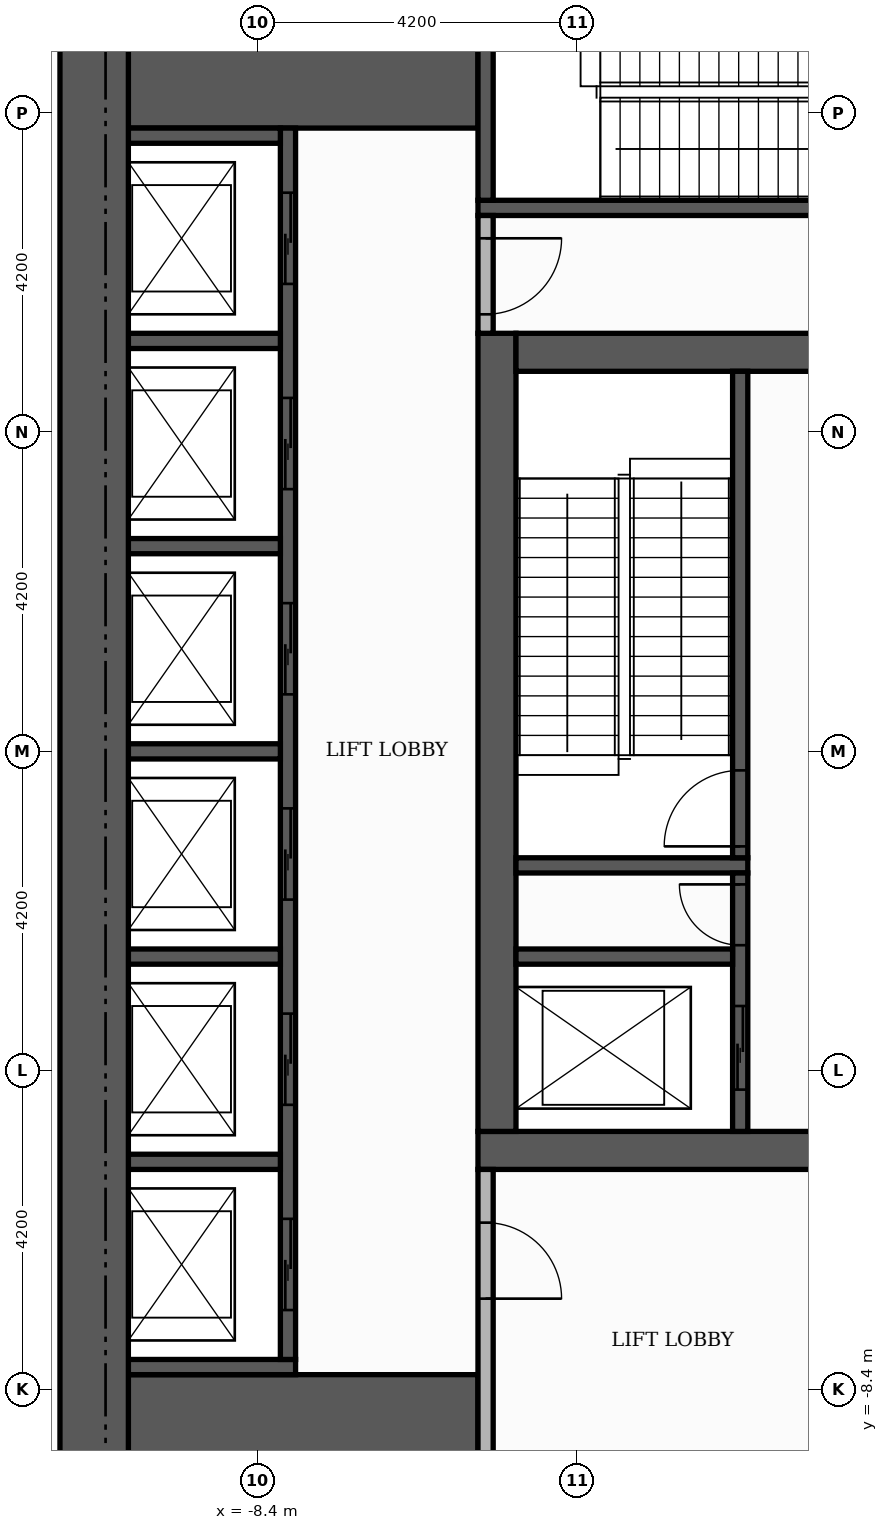
"""IFC4 building model, lengths in metres.
Left out: names, types, materials, properties, quantities, classifications, styles, units other than length and angle.
Written with IfcOpenShell. Run it as: python <this file> out.ifc"""

import sys

from ifc_helpers import new_model, si_unit, direction, frame, frame_2d, origin, place, context, subcontext, project, spatial, rectangle, extrude, element, fill, save


model = new_model("IFC4")
c1 = context("Model", 3, precision=1e-05, world=origin(), true_north=direction((0.0, 1.0)))
c2 = subcontext(c1, "Body", "Model", "MODEL_VIEW")
j1 = project(units=[si_unit("LENGTHUNIT", "METRE"), si_unit("PLANEANGLEUNIT", "RADIAN")], contexts=[c1])
p1 = place(None, origin())
s1 = spatial("IfcSite", under=j1, at=p1, CompositionType="ELEMENT")
p2 = place(p1, origin())
s2 = spatial("IfcBuilding", under=s1, at=p2, CompositionType="ELEMENT")
p3 = place(p2, frame((0.0, 0.0, 73.8)))
s3 = spatial("IfcBuildingStorey", under=s2, at=p3, CompositionType="ELEMENT", Elevation=73.8)
p4 = place(p3, frame((-5.5, -5.25, 0.0), z_axis=(0.0, 0.0, 1.0), x_axis=(1.0, 0.0, 0.0)))
e1 = element("IfcWall", 1, at=p4, inside=s3, PredefinedType="SHEAR", context=c2, shape_type="SweptSolid", body=[
    extrude(rectangle(XDim=11.0, YDim=0.5, at=frame_2d((5.5, 0.0))), origin(), (0.0, 0.0, 1.0), 4.98),
])
p5 = place(p4, frame((4.9, 0.0, 0.0)))
e2 = element("IfcOpeningElement", 2, at=p5, cuts=e1, PredefinedType="OPENING", context=c2, shape_type="SweptSolid", body=[
    extrude(rectangle(XDim=1.2, YDim=2.1, at=frame_2d((0.6, 1.05))), frame((0.0, 0.26, 0.0), z_axis=(0.0, -1.0, 0.0), x_axis=(1.0, 0.0, 0.0)), (0.0, 0.0, 1.0), 0.52),
])
p6 = place(p3, frame((-5.25, -5.0, 0.0), z_axis=(0.0, 0.0, 1.0), x_axis=(0.0, 1.0, 0.0)))
e3 = element("IfcWall", 3, at=p6, inside=s3, PredefinedType="SHEAR", context=c2, shape_type="SweptSolid", body=[
    extrude(rectangle(XDim=10.5, YDim=0.5, at=frame_2d((5.25, 0.0))), origin(), (0.0, 0.0, 1.0), 4.98),
])
p7 = place(p3, frame((-5.0, 5.25, 0.0), z_axis=(0.0, 0.0, 1.0), x_axis=(1.0, 0.0, 0.0)))
e4 = element("IfcWall", 4, at=p7, inside=s3, PredefinedType="SHEAR", context=c2, shape_type="SweptSolid", body=[
    extrude(rectangle(XDim=10.0, YDim=0.5, at=frame_2d((5.0, 0.0))), origin(), (0.0, 0.0, 1.0), 4.98),
])
p8 = place(p7, frame((4.4, 0.0, 0.0)))
e5 = element("IfcOpeningElement", 5, at=p8, cuts=e4, PredefinedType="OPENING", context=c2, shape_type="SweptSolid", body=[
    extrude(rectangle(XDim=1.2, YDim=2.1, at=frame_2d((0.6, 1.05))), frame((0.0, 0.26, 0.0), z_axis=(0.0, -1.0, 0.0), x_axis=(1.0, 0.0, 0.0)), (0.0, 0.0, 1.0), 0.52),
])
for number, where, z_axis, x_axis in (
    (6, (-10.1, -9.15, 0.0), (0.0, 0.0, 1.0), (1.0, 0.0, 0.0)),
    (7, (-10.1, 9.15, 0.0), (0.0, 0.0, 1.0), (1.0, 0.0, 0.0)),
):
    element("IfcWall", number, at=place(p3, frame(where, z_axis=z_axis, x_axis=x_axis)), inside=s3, PredefinedType="SHEAR", context=c2, shape_type="SweptSolid", body=[
        extrude(rectangle(XDim=4.6, YDim=1.9, at=frame_2d((2.3, 0.0))), origin(), (0.0, 0.0, 1.0), 4.98),
    ])
p9 = place(p3, frame((-5.0, -1.5, 0.0), z_axis=(0.0, 0.0, 1.0), x_axis=(1.0, 0.0, 0.0)))
e8 = element("IfcWall", 8, at=p9, inside=s3, PredefinedType="SHEAR", context=c2, shape_type="SweptSolid", body=[
    extrude(rectangle(XDim=3.05, YDim=0.2, at=frame_2d((1.525, 0.0))), origin(), (0.0, 0.0, 1.0), 4.98),
])
p10 = place(p3, frame((-2.05, -1.4, 0.0), z_axis=(0.0, 0.0, 1.0), x_axis=(0.0, 1.0, 0.0)))
e9 = element("IfcWall", 9, at=p10, inside=s3, PredefinedType="SHEAR", context=c2, shape_type="SweptSolid", body=[
    extrude(rectangle(XDim=6.4, YDim=0.2, at=frame_2d((3.2, 0.0))), origin(), (0.0, 0.0, 1.0), 4.98),
])
p11 = place(p10, frame((0.15, 0.0, 0.0)))
e10 = element("IfcOpeningElement", 10, at=p11, cuts=e9, PredefinedType="OPENING", context=c2, shape_type="SweptSolid", body=[
    extrude(rectangle(XDim=1.0, YDim=2.1, at=frame_2d((0.5, 1.05))), frame((0.0, 0.11, 0.0), z_axis=(0.0, -1.0, 0.0), x_axis=(1.0, 0.0, 0.0)), (0.0, 0.0, 1.0), 0.22),
])
p12 = place(p3, frame((-5.5, 7.15, 0.0), z_axis=(0.0, 0.0, 1.0), x_axis=(1.0, 0.0, 0.0)))
e11 = element("IfcWall", 11, at=p12, inside=s3, PredefinedType="SHEAR", context=c2, shape_type="SweptSolid", body=[
    extrude(rectangle(XDim=6.8, YDim=0.2, at=frame_2d((3.4, 0.0))), origin(), (0.0, 0.0, 1.0), 4.98),
])
p13 = place(p3, frame((-5.4, 7.25, 0.0), z_axis=(0.0, 0.0, 1.0), x_axis=(0.0, 1.0, 0.0)))
e12 = element("IfcWall", 12, at=p13, inside=s3, PredefinedType="SHEAR", context=c2, shape_type="SweptSolid", body=[
    extrude(rectangle(XDim=2.85, YDim=0.2, at=frame_2d((1.425, 0.0))), origin(), (0.0, 0.0, 1.0), 4.98),
])
p14 = place(p3, frame((-10.1, -8.1, 0.0), z_axis=(0.0, 0.0, 1.0), x_axis=(1.0, 0.0, 0.0)))
e13 = element("IfcWall", 13, at=p14, inside=s3, PredefinedType="SHEAR", context=c2, shape_type="SweptSolid", body=[
    extrude(rectangle(XDim=2.2, YDim=0.2, at=frame_2d((1.1, 0.0))), origin(), (0.0, 0.0, 1.0), 4.98),
])
p15 = place(p3, frame((-8.0, -8.0, 0.0), z_axis=(0.0, 0.0, 1.0), x_axis=(0.0, 1.0, 0.0)))
e14 = element("IfcWall", 14, at=p15, inside=s3, PredefinedType="SHEAR", context=c2, shape_type="SweptSolid", body=[
    extrude(rectangle(XDim=16.2, YDim=0.2, at=frame_2d((8.1, 0.0))), origin(), (0.0, 0.0, 1.0), 4.98),
])
p16 = place(p15, frame((0.65, 0.0, 0.0)))
e15 = element("IfcOpeningElement", 15, at=p16, cuts=e14, PredefinedType="OPENING", context=c2, shape_type="SweptSolid", body=[
    extrude(rectangle(XDim=1.2, YDim=2.1, at=frame_2d((0.6, 1.05))), frame((0.0, 0.11, 0.0), z_axis=(0.0, -1.0, 0.0), x_axis=(1.0, 0.0, 0.0)), (0.0, 0.0, 1.0), 0.22),
])
p17 = place(p15, frame((3.35, 0.0, 0.0)))
e16 = element("IfcOpeningElement", 16, at=p17, cuts=e14, PredefinedType="OPENING", context=c2, shape_type="SweptSolid", body=[
    extrude(rectangle(XDim=1.2, YDim=2.1, at=frame_2d((0.6, 1.05))), frame((0.0, 0.11, 0.0), z_axis=(0.0, -1.0, 0.0), x_axis=(1.0, 0.0, 0.0)), (0.0, 0.0, 1.0), 0.22),
])
p18 = place(p15, frame((6.05, 0.0, 0.0)))
e17 = element("IfcOpeningElement", 17, at=p18, cuts=e14, PredefinedType="OPENING", context=c2, shape_type="SweptSolid", body=[
    extrude(rectangle(XDim=1.2, YDim=2.1, at=frame_2d((0.6, 1.05))), frame((0.0, 0.11, 0.0), z_axis=(0.0, -1.0, 0.0), x_axis=(1.0, 0.0, 0.0)), (0.0, 0.0, 1.0), 0.22),
])
p19 = place(p15, frame((8.75, 0.0, 0.0)))
e18 = element("IfcOpeningElement", 18, at=p19, cuts=e14, PredefinedType="OPENING", context=c2, shape_type="SweptSolid", body=[
    extrude(rectangle(XDim=1.2, YDim=2.1, at=frame_2d((0.6, 1.05))), frame((0.0, 0.11, 0.0), z_axis=(0.0, -1.0, 0.0), x_axis=(1.0, 0.0, 0.0)), (0.0, 0.0, 1.0), 0.22),
])
p20 = place(p15, frame((11.45, 0.0, 0.0)))
e19 = element("IfcOpeningElement", 19, at=p20, cuts=e14, PredefinedType="OPENING", context=c2, shape_type="SweptSolid", body=[
    extrude(rectangle(XDim=1.2, YDim=2.1, at=frame_2d((0.6, 1.05))), frame((0.0, 0.11, 0.0), z_axis=(0.0, -1.0, 0.0), x_axis=(1.0, 0.0, 0.0)), (0.0, 0.0, 1.0), 0.22),
])
p21 = place(p15, frame((14.15, 0.0, 0.0)))
e20 = element("IfcOpeningElement", 20, at=p21, cuts=e14, PredefinedType="OPENING", context=c2, shape_type="SweptSolid", body=[
    extrude(rectangle(XDim=1.2, YDim=2.1, at=frame_2d((0.6, 1.05))), frame((0.0, 0.11, 0.0), z_axis=(0.0, -1.0, 0.0), x_axis=(1.0, 0.0, 0.0)), (0.0, 0.0, 1.0), 0.22),
])
p22 = place(p3, frame((-10.1, -5.4, 0.0), z_axis=(0.0, 0.0, 1.0), x_axis=(1.0, 0.0, 0.0)))
e21 = element("IfcWall", 21, at=p22, inside=s3, PredefinedType="SHEAR", context=c2, shape_type="SweptSolid", body=[
    extrude(rectangle(XDim=2.0, YDim=0.2, at=frame_2d((1.0, 0.0))), origin(), (0.0, 0.0, 1.0), 4.98),
])
p23 = place(p3, frame((-2.05, -5.0, 0.0), z_axis=(0.0, 0.0, 1.0), x_axis=(0.0, 1.0, 0.0)))
e22 = element("IfcWall", 22, at=p23, inside=s3, PredefinedType="SHEAR", context=c2, shape_type="SweptSolid", body=[
    extrude(rectangle(XDim=3.4, YDim=0.2, at=frame_2d((1.7, 0.0))), origin(), (0.0, 0.0, 1.0), 4.98),
])
p24 = place(p23, frame((0.55, 0.0, 0.0)))
e23 = element("IfcOpeningElement", 23, at=p24, cuts=e22, PredefinedType="OPENING", context=c2, shape_type="SweptSolid", body=[
    extrude(rectangle(XDim=1.1, YDim=2.1, at=frame_2d((0.55, 1.05))), frame((0.0, 0.11, 0.0), z_axis=(0.0, -1.0, 0.0), x_axis=(1.0, 0.0, 0.0)), (0.0, 0.0, 1.0), 0.22),
])
p25 = place(p23, frame((2.45, 0.0, 0.0)))
e24 = element("IfcOpeningElement", 24, at=p25, cuts=e22, PredefinedType="OPENING", context=c2, shape_type="SweptSolid", body=[
    extrude(rectangle(XDim=0.8, YDim=2.1, at=frame_2d((0.4, 1.05))), frame((0.0, 0.11, 0.0), z_axis=(0.0, -1.0, 0.0), x_axis=(1.0, 0.0, 0.0)), (0.0, 0.0, 1.0), 0.22),
])
p26 = place(p3, frame((-10.1, -2.7, 0.0), z_axis=(0.0, 0.0, 1.0), x_axis=(1.0, 0.0, 0.0)))
e25 = element("IfcWall", 25, at=p26, inside=s3, PredefinedType="SHEAR", context=c2, shape_type="SweptSolid", body=[
    extrude(rectangle(XDim=2.0, YDim=0.2, at=frame_2d((1.0, 0.0))), origin(), (0.0, 0.0, 1.0), 4.98),
])
p27 = place(p3, frame((-5.0, -2.7, 0.0), z_axis=(0.0, 0.0, 1.0), x_axis=(1.0, 0.0, 0.0)))
e26 = element("IfcWall", 26, at=p27, inside=s3, PredefinedType="SHEAR", context=c2, shape_type="SweptSolid", body=[
    extrude(rectangle(XDim=2.85, YDim=0.2, at=frame_2d((1.425, 0.0))), origin(), (0.0, 0.0, 1.0), 4.98),
])
for number, where, z_axis, x_axis in (
    (27, (-10.1, 0.0, 0.0), (0.0, 0.0, 1.0), (1.0, 0.0, 0.0)),
    (28, (-10.1, 2.7, 0.0), (0.0, 0.0, 1.0), (1.0, 0.0, 0.0)),
    (29, (-10.1, 5.4, 0.0), (0.0, 0.0, 1.0), (1.0, 0.0, 0.0)),
    (30, (-10.1, 8.1, 0.0), (0.0, 0.0, 1.0), (1.0, 0.0, 0.0)),
):
    element("IfcWall", number, at=place(p3, frame(where, z_axis=z_axis, x_axis=x_axis)), inside=s3, PredefinedType="SHEAR", context=c2, shape_type="SweptSolid", body=[
        extrude(rectangle(XDim=2.0, YDim=0.2, at=frame_2d((1.0, 0.0))), origin(), (0.0, 0.0, 1.0), 4.98),
    ])
p28 = place(p3, frame((-10.55, -10.1, 0.0), z_axis=(0.0, 0.0, 1.0), x_axis=(0.0, 1.0, 0.0)))
e31 = element("IfcWall", 31, at=p28, inside=s3, PredefinedType="SHEAR", context=c2, shape_type="SweptSolid", body=[
    extrude(rectangle(XDim=20.2, YDim=0.9, at=frame_2d((10.1, 0.0))), origin(), (0.0, 0.0, 1.0), 4.98),
])
p29 = place(p3, frame((-5.4, -10.1, 0.0), z_axis=(0.0, 0.0, 1.0), x_axis=(0.0, 1.0, 0.0)))
e32 = element("IfcWall", 32, at=p29, inside=s3, PredefinedType="PARTITIONING", context=c2, shape_type="SweptSolid", body=[
    extrude(rectangle(XDim=4.6, YDim=0.2, at=frame_2d((2.3, 0.0))), origin(), (0.0, 0.0, 1.0), 4.98),
])
p30 = place(p29, frame((2.9, 0.0, 0.0)))
e33 = element("IfcOpeningElement", 33, at=p30, cuts=e32, PredefinedType="OPENING", context=c2, shape_type="SweptSolid", body=[
    extrude(rectangle(XDim=1.0, YDim=2.1, at=frame_2d((0.5, 1.05))), frame((0.0, 0.11, 0.0), z_axis=(0.0, -1.0, 0.0), x_axis=(1.0, 0.0, 0.0)), (0.0, 0.0, 1.0), 0.22),
])
p31 = place(p3, frame((-5.4, 5.5, 0.0), z_axis=(0.0, 0.0, 1.0), x_axis=(0.0, 1.0, 0.0)))
e34 = element("IfcWall", 34, at=p31, inside=s3, PredefinedType="PARTITIONING", context=c2, shape_type="SweptSolid", body=[
    extrude(rectangle(XDim=1.55, YDim=0.2, at=frame_2d((0.775, 0.0))), origin(), (0.0, 0.0, 1.0), 4.98),
])
p32 = place(p31, frame((0.25, 0.0, 0.0)))
e35 = element("IfcOpeningElement", 35, at=p32, cuts=e34, PredefinedType="OPENING", context=c2, shape_type="SweptSolid", body=[
    extrude(rectangle(XDim=1.0, YDim=2.1, at=frame_2d((0.5, 1.05))), frame((0.0, 0.11, 0.0), z_axis=(0.0, -1.0, 0.0), x_axis=(1.0, 0.0, 0.0)), (0.0, 0.0, 1.0), 0.22),
])
p33 = place(p16, origin())
e36 = element("IfcDoor", 36, at=p33, inside=s3, OperationType="SLIDING_TO_LEFT", PredefinedType="DOOR", context=c2, shape_type="SweptSolid", body=[
    extrude(rectangle(XDim=1.2, YDim=2.1, at=frame_2d((0.6, 1.05))), frame((0.0, 0.025, 0.0), z_axis=(0.0, -1.0, 0.0), x_axis=(1.0, 0.0, 0.0)), (0.0, 0.0, 1.0), 0.05),
])
fill(e15, e36)
p34 = place(p17, origin())
e37 = element("IfcDoor", 37, at=p34, inside=s3, OperationType="SLIDING_TO_LEFT", PredefinedType="DOOR", context=c2, shape_type="SweptSolid", body=[
    extrude(rectangle(XDim=1.2, YDim=2.1, at=frame_2d((0.6, 1.05))), frame((0.0, 0.025, 0.0), z_axis=(0.0, -1.0, 0.0), x_axis=(1.0, 0.0, 0.0)), (0.0, 0.0, 1.0), 0.05),
])
fill(e16, e37)
p35 = place(p18, origin())
e38 = element("IfcDoor", 38, at=p35, inside=s3, OperationType="SLIDING_TO_LEFT", PredefinedType="DOOR", context=c2, shape_type="SweptSolid", body=[
    extrude(rectangle(XDim=1.2, YDim=2.1, at=frame_2d((0.6, 1.05))), frame((0.0, 0.025, 0.0), z_axis=(0.0, -1.0, 0.0), x_axis=(1.0, 0.0, 0.0)), (0.0, 0.0, 1.0), 0.05),
])
fill(e17, e38)
p36 = place(p19, origin())
e39 = element("IfcDoor", 39, at=p36, inside=s3, OperationType="SLIDING_TO_LEFT", PredefinedType="DOOR", context=c2, shape_type="SweptSolid", body=[
    extrude(rectangle(XDim=1.2, YDim=2.1, at=frame_2d((0.6, 1.05))), frame((0.0, 0.025, 0.0), z_axis=(0.0, -1.0, 0.0), x_axis=(1.0, 0.0, 0.0)), (0.0, 0.0, 1.0), 0.05),
])
fill(e18, e39)
p37 = place(p20, origin())
e40 = element("IfcDoor", 40, at=p37, inside=s3, OperationType="SLIDING_TO_LEFT", PredefinedType="DOOR", context=c2, shape_type="SweptSolid", body=[
    extrude(rectangle(XDim=1.2, YDim=2.1, at=frame_2d((0.6, 1.05))), frame((0.0, 0.025, 0.0), z_axis=(0.0, -1.0, 0.0), x_axis=(1.0, 0.0, 0.0)), (0.0, 0.0, 1.0), 0.05),
])
fill(e19, e40)
p38 = place(p21, origin())
e41 = element("IfcDoor", 41, at=p38, inside=s3, OperationType="SLIDING_TO_LEFT", PredefinedType="DOOR", context=c2, shape_type="SweptSolid", body=[
    extrude(rectangle(XDim=1.2, YDim=2.1, at=frame_2d((0.6, 1.05))), frame((0.0, 0.025, 0.0), z_axis=(0.0, -1.0, 0.0), x_axis=(1.0, 0.0, 0.0)), (0.0, 0.0, 1.0), 0.05),
])
fill(e20, e41)
p39 = place(p24, origin())
e42 = element("IfcDoor", 42, at=p39, inside=s3, OperationType="SLIDING_TO_LEFT", PredefinedType="DOOR", context=c2, shape_type="SweptSolid", body=[
    extrude(rectangle(XDim=1.1, YDim=2.1, at=frame_2d((0.55, 1.05))), frame((0.0, 0.025, 0.0), z_axis=(0.0, -1.0, 0.0), x_axis=(1.0, 0.0, 0.0)), (0.0, 0.0, 1.0), 0.05),
])
fill(e23, e42)
p40 = place(p11, origin())
e43 = element("IfcDoor", 43, at=p40, inside=s3, OperationType="SINGLE_SWING_LEFT", PredefinedType="DOOR", context=c2, shape_type="SweptSolid", body=[
    extrude(rectangle(XDim=1.0, YDim=2.1, at=frame_2d((0.5, 1.05))), frame((0.0, 0.025, 0.0), z_axis=(0.0, -1.0, 0.0), x_axis=(1.0, 0.0, 0.0)), (0.0, 0.0, 1.0), 0.05),
])
fill(e10, e43)
p41 = place(p25, origin())
e44 = element("IfcDoor", 44, at=p41, inside=s3, OperationType="SINGLE_SWING_RIGHT", PredefinedType="DOOR", context=c2, shape_type="SweptSolid", body=[
    extrude(rectangle(XDim=0.8, YDim=2.1, at=frame_2d((0.4, 1.05))), frame((0.0, 0.025, 0.0), z_axis=(0.0, -1.0, 0.0), x_axis=(1.0, 0.0, 0.0)), (0.0, 0.0, 1.0), 0.05),
])
fill(e24, e44)
p42 = place(p32, frame((1.0, 0.0, 0.0), z_axis=(0.0, 0.0, 1.0), x_axis=(-1.0, 0.0, 0.0)))
e45 = element("IfcDoor", 45, at=p42, inside=s3, OperationType="SINGLE_SWING_RIGHT", PredefinedType="DOOR", context=c2, shape_type="SweptSolid", body=[
    extrude(rectangle(XDim=1.0, YDim=2.1, at=frame_2d((0.5, 1.05))), frame((0.0, 0.025, 0.0), z_axis=(0.0, -1.0, 0.0), x_axis=(1.0, 0.0, 0.0)), (0.0, 0.0, 1.0), 0.05),
])
fill(e35, e45)
p43 = place(p30, frame((1.0, 0.0, 0.0), z_axis=(0.0, 0.0, 1.0), x_axis=(-1.0, 0.0, 0.0)))
e46 = element("IfcDoor", 46, at=p43, inside=s3, OperationType="SINGLE_SWING_LEFT", PredefinedType="DOOR", context=c2, shape_type="SweptSolid", body=[
    extrude(rectangle(XDim=1.0, YDim=2.1, at=frame_2d((0.5, 1.05))), frame((0.0, 0.025, 0.0), z_axis=(0.0, -1.0, 0.0), x_axis=(1.0, 0.0, 0.0)), (0.0, 0.0, 1.0), 0.05),
])
fill(e33, e46)
save(model, sys.argv[1])
